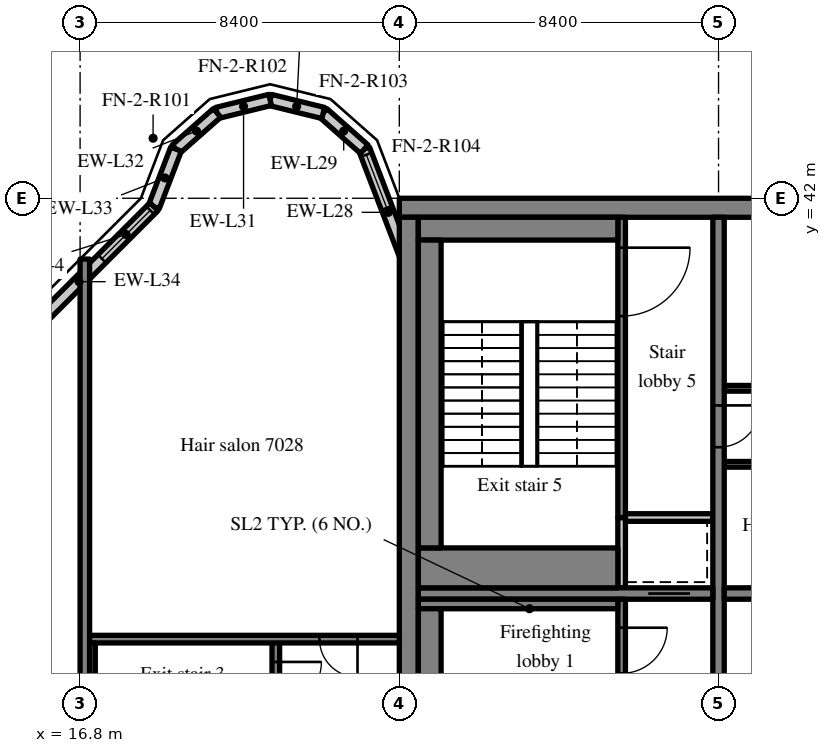
"""IFC4 building model, lengths in metres.
Left out: names, types, materials, properties, quantities, classifications, styles, units other than length and angle.
Written with IfcOpenShell. Run it as: python <this file> out.ifc"""

import sys

from ifc_helpers import new_model, si_unit, direction, frame, frame_2d, origin, place, context, subcontext, project, spatial, rectangle, extrude, source, transform, mapped, element, fill, save


model = new_model("IFC4")
c1 = context("Model", 3, precision=1e-05, world=origin(), true_north=direction((0.0, 1.0)))
c2 = subcontext(c1, "Body", "Model", "MODEL_VIEW")
j1 = project(units=[si_unit("LENGTHUNIT", "METRE"), si_unit("PLANEANGLEUNIT", "RADIAN")], contexts=[c1])
p1 = place(None, origin())
s1 = spatial("IfcSite", under=j1, at=p1, CompositionType="ELEMENT")
p2 = place(p1, origin())
s2 = spatial("IfcBuilding", under=s1, at=p2, CompositionType="ELEMENT")
p3 = place(p2, frame((0.0, 0.0, 293.7)))
s3 = spatial("IfcBuildingStorey", under=s2, at=p3, CompositionType="ELEMENT", Elevation=293.7)
m1 = source(origin(), c2, "Body", "SweptSolid", [
    extrude(rectangle(XDim=50.4, YDim=0.5, at=frame_2d((25.2, 0.0))), origin(), (0.0, 0.0, 1.0), 3.72),
])
p4 = place(p3, frame((25.2, 41.75, 0.0), z_axis=(0.0, 0.0, 1.0), x_axis=(1.0, 0.0, 0.0)))
e1 = element("IfcWall", 1, at=p4, inside=s3, PredefinedType="SHEAR", context=c2, shape_type="MappedRepresentation", body=[
    mapped(m1, transform((0.0, 0.0, 0.0), scale=1.0)),
])
m2 = source(origin(), c2, "Body", "SweptSolid", [
    extrude(rectangle(XDim=19.0, YDim=0.5, at=frame_2d((9.5, 0.0))), origin(), (0.0, 0.0, 1.0), 3.72),
])
p5 = place(p3, frame((25.45, 22.5, 0.0), z_axis=(0.0, 0.0, 1.0), x_axis=(0.0, 1.0, 0.0)))
e2 = element("IfcWall", 2, at=p5, inside=s3, PredefinedType="SHEAR", context=c2, shape_type="MappedRepresentation", body=[
    mapped(m2, transform((0.0, 0.0, 0.0), scale=1.0)),
])
m3 = source(origin(), c2, "Body", "SweptSolid", [
    extrude(rectangle(XDim=19.0, YDim=0.3, at=frame_2d((9.5, 0.0))), origin(), (0.0, 0.0, 1.0), 3.72),
])
p6 = place(p3, frame((33.6, 22.5, 0.0), z_axis=(0.0, 0.0, 1.0), x_axis=(0.0, 1.0, 0.0)))
e3 = element("IfcWall", 3, at=p6, inside=s3, PredefinedType="SHEAR", context=c2, shape_type="MappedRepresentation", body=[
    mapped(m3, transform((0.0, 0.0, 0.0), scale=1.0)),
])
m4 = source(origin(), c2, "Body", "SweptSolid", [
    extrude(rectangle(XDim=1.1, YDim=2.1, at=frame_2d((0.55, 1.05))), frame((0.0, 0.16, 0.0), z_axis=(0.0, -1.0, 0.0), x_axis=(1.0, 0.0, 0.0)), (0.0, 0.0, 1.0), 0.32),
])
p7 = place(p6, frame((12.95, 0.0, 0.0)))
e4 = element("IfcOpeningElement", 4, at=p7, cuts=e3, PredefinedType="OPENING", context=c2, shape_type="MappedRepresentation", body=[
    mapped(m4, transform((0.0, 0.0, 0.0), scale=1.0)),
])
m5 = source(origin(), c2, "Body", "SweptSolid", [
    extrude(rectangle(XDim=7.75, YDim=0.3, at=frame_2d((3.875, 0.0))), origin(), (0.0, 0.0, 1.0), 3.72),
])
p8 = place(p3, frame((25.7, 31.6, 0.0), z_axis=(0.0, 0.0, 1.0), x_axis=(1.0, 0.0, 0.0)))
e5 = element("IfcWall", 5, at=p8, inside=s3, PredefinedType="SHEAR", context=c2, shape_type="MappedRepresentation", body=[
    mapped(m5, transform((0.0, 0.0, 0.0), scale=1.0)),
])
p9 = place(p8, frame((6.05, 0.0, 0.0)))
e6 = element("IfcOpeningElement", 6, at=p9, cuts=e5, PredefinedType="OPENING", context=c2, shape_type="MappedRepresentation", body=[
    mapped(m4, transform((0.0, 0.0, 0.0), scale=1.0)),
])
m6 = source(origin(), c2, "Body", "SweptSolid", [
    extrude(rectangle(XDim=16.5, YDim=0.3, at=frame_2d((8.25, 0.0))), origin(), (0.0, 0.0, 1.0), 3.72),
])
p10 = place(p3, frame((33.75, 31.6, 0.0), z_axis=(0.0, 0.0, 1.0), x_axis=(1.0, 0.0, 0.0)))
e7 = element("IfcWall", 7, at=p10, inside=s3, PredefinedType="SHEAR", context=c2, shape_type="MappedRepresentation", body=[
    mapped(m6, transform((0.0, 0.0, 0.0), scale=1.0)),
])
m7 = source(origin(), c2, "Body", "SweptSolid", [
    extrude(rectangle(XDim=1.0, YDim=2.1, at=frame_2d((0.5, 1.05))), frame((0.0, 0.16, 0.0), z_axis=(0.0, -1.0, 0.0), x_axis=(1.0, 0.0, 0.0)), (0.0, 0.0, 1.0), 0.32),
])
p11 = place(p10, frame((14.875, 0.0, 0.0)))
e8 = element("IfcOpeningElement", 8, at=p11, cuts=e7, PredefinedType="OPENING", context=c2, shape_type="MappedRepresentation", body=[
    mapped(m7, transform((0.0, 0.0, 0.0), scale=1.0)),
])
m8 = source(origin(), c2, "Body", "SweptSolid", [
    extrude(rectangle(XDim=18.4, YDim=0.25, at=frame_2d((9.2, 0.0))), origin(), (0.0, 0.0, 1.0), 3.72),
])
p12 = place(p3, frame((16.925, 22.0, 0.0), z_axis=(0.0, 0.0, 1.0), x_axis=(0.0, 1.0, 0.0)))
e9 = element("IfcWall", 9, at=p12, inside=s3, PredefinedType="SHEAR", context=c2, shape_type="MappedRepresentation", body=[
    mapped(m8, transform((0.0, 0.0, 0.0), scale=1.0)),
])
m9 = source(origin(), c2, "Body", "SweptSolid", [
    extrude(rectangle(XDim=3.559, YDim=0.3, at=frame_2d((1.78, 0.0))), origin(), (0.0, 0.0, 1.0), 3.72),
])
p13 = place(p3, frame((25.55, 39.969, 0.0), z_axis=(0.0, 0.0, 1.0), x_axis=(-0.35779745313, 0.933799219604, 0.0)))
e10 = element("IfcWall", 10, at=p13, inside=s3, PredefinedType="SOLIDWALL", context=c2, shape_type="MappedRepresentation", body=[
    mapped(m9, transform((0.0, 0.0, 0.0), scale=1.0)),
])
m10 = source(origin(), c2, "Body", "SweptSolid", [
    extrude(rectangle(XDim=1.5, YDim=2.0, at=frame_2d((0.75, 1.0))), frame((0.0, 0.16, 0.0), z_axis=(0.0, -1.0, 0.0), x_axis=(1.0, 0.0, 0.0)), (0.0, 0.0, 1.0), 0.32),
])
p14 = place(p13, frame((1.903, 0.0, 0.9)))
e11 = element("IfcOpeningElement", 11, at=p14, cuts=e10, PredefinedType="OPENING", context=c2, shape_type="MappedRepresentation", body=[
    mapped(m10, transform((0.0, 0.0, 0.0), scale=1.0)),
])
m11 = source(origin(), c2, "Body", "SweptSolid", [
    extrude(rectangle(XDim=1.44, YDim=0.3, at=frame_2d((0.72, 0.0))), origin(), (0.0, 0.0, 1.0), 3.72),
])
p15 = place(p3, frame((24.277, 43.292, 0.0), z_axis=(0.0, 0.0, 1.0), x_axis=(-0.749649827867, 0.661834673902, 0.0)))
e12 = element("IfcWall", 12, at=p15, inside=s3, PredefinedType="SOLIDWALL", context=c2, shape_type="MappedRepresentation", body=[
    mapped(m11, transform((0.0, 0.0, 0.0), scale=1.0)),
])
m12 = source(origin(), c2, "Body", "SweptSolid", [
    extrude(rectangle(XDim=1.438, YDim=0.3, at=frame_2d((0.719, 0.0))), origin(), (0.0, 0.0, 1.0), 3.72),
])
p16 = place(p3, frame((23.197, 44.245, 0.0), z_axis=(0.0, 0.0, 1.0), x_axis=(-0.971152283879, 0.238460146601, 0.0)))
e13 = element("IfcWall", 13, at=p16, inside=s3, PredefinedType="SOLIDWALL", context=c2, shape_type="MappedRepresentation", body=[
    mapped(m12, transform((0.0, 0.0, 0.0), scale=1.0)),
])
m13 = source(origin(), c2, "Body", "SweptSolid", [
    extrude(rectangle(XDim=1.439, YDim=0.3, at=frame_2d((0.719, 0.0))), origin(), (0.0, 0.0, 1.0), 3.72),
])
p17 = place(p3, frame((21.8, 44.588, 0.0), z_axis=(0.0, 0.0, 1.0), x_axis=(-0.971161932466, -0.238420848351, 0.0)))
e14 = element("IfcWall", 14, at=p17, inside=s3, PredefinedType="SOLIDWALL", context=c2, shape_type="MappedRepresentation", body=[
    mapped(m13, transform((0.0, 0.0, 0.0), scale=1.0)),
])
m14 = source(origin(), c2, "Body", "SweptSolid", [
    extrude(rectangle(XDim=1.44, YDim=0.3, at=frame_2d((0.72, 0.0))), origin(), (0.0, 0.0, 1.0), 3.72),
])
p18 = place(p3, frame((20.403, 44.245, 0.0), z_axis=(0.0, 0.0, 1.0), x_axis=(-0.74957555648, -0.661918790432, 0.0)))
e15 = element("IfcWall", 15, at=p18, inside=s3, PredefinedType="SOLIDWALL", context=c2, shape_type="MappedRepresentation", body=[
    mapped(m14, transform((0.0, 0.0, 0.0), scale=1.0)),
])
m15 = source(origin(), c2, "Body", "SweptSolid", [
    extrude(rectangle(XDim=1.622, YDim=0.3, at=frame_2d((0.811, 0.0))), origin(), (0.0, 0.0, 1.0), 3.72),
])
p19 = place(p3, frame((19.323, 43.292, 0.0), z_axis=(0.0, 0.0, 1.0), x_axis=(-0.357778527068, -0.933806471154, 0.0)))
e16 = element("IfcWall", 16, at=p19, inside=s3, PredefinedType="SOLIDWALL", context=c2, shape_type="MappedRepresentation", body=[
    mapped(m15, transform((0.0, 0.0, 0.0), scale=1.0)),
])
m16 = source(origin(), c2, "Body", "SweptSolid", [
    extrude(rectangle(XDim=5.576, YDim=0.3, at=frame_2d((2.788, 0.0))), origin(), (0.0, 0.0, 1.0), 3.72),
])
p20 = place(p3, frame((18.743, 41.777, 0.0), z_axis=(0.0, 0.0, 1.0), x_axis=(-0.707106781187, -0.707106781187, 0.0)))
e17 = element("IfcWall", 17, at=p20, inside=s3, PredefinedType="SOLIDWALL", context=c2, shape_type="MappedRepresentation", body=[
    mapped(m16, transform((0.0, 0.0, 0.0), scale=1.0)),
])
m17 = source(origin(), c2, "Body", "SweptSolid", [
    extrude(rectangle(XDim=1.8, YDim=1.5, at=frame_2d((0.9, 0.75))), frame((0.0, 0.16, 0.0), z_axis=(0.0, -1.0, 0.0), x_axis=(1.0, 0.0, 0.0)), (0.0, 0.0, 1.0), 0.32),
])
p21 = place(p20, frame((0.135, 0.0, 0.9)))
e18 = element("IfcOpeningElement", 18, at=p21, cuts=e17, PredefinedType="OPENING", context=c2, shape_type="MappedRepresentation", body=[
    mapped(m17, transform((0.0, 0.0, 0.0), scale=1.0)),
])
m18 = source(origin(), c2, "Body", "SweptSolid", [
    extrude(rectangle(XDim=14.25, YDim=0.15, at=frame_2d((7.125, 0.0))), origin(), (0.0, 0.0, 1.0), 3.72),
])
p22 = place(p3, frame((33.75, 35.0, 0.0), z_axis=(0.0, 0.0, 1.0), x_axis=(1.0, 0.0, 0.0)))
e19 = element("IfcWall", 19, at=p22, inside=s3, PredefinedType="PARTITIONING", context=c2, shape_type="MappedRepresentation", body=[
    mapped(m18, transform((0.0, 0.0, 0.0), scale=1.0)),
])
m19 = source(origin(), c2, "Body", "SweptSolid", [
    extrude(rectangle(XDim=0.9, YDim=2.1, at=frame_2d((0.45, 1.05))), frame((0.0, 0.085, 0.0), z_axis=(0.0, -1.0, 0.0), x_axis=(1.0, 0.0, 0.0)), (0.0, 0.0, 1.0), 0.17),
])
p23 = place(p22, frame((2.031, 0.0, 0.0)))
e20 = element("IfcOpeningElement", 20, at=p23, cuts=e19, PredefinedType="OPENING", context=c2, shape_type="MappedRepresentation", body=[
    mapped(m19, transform((0.0, 0.0, 0.0), scale=1.0)),
])
p24 = place(p22, frame((9.118, 0.0, 0.0)))
e21 = element("IfcOpeningElement", 21, at=p24, cuts=e19, PredefinedType="OPENING", context=c2, shape_type="MappedRepresentation", body=[
    mapped(m19, transform((0.0, 0.0, 0.0), scale=1.0)),
])
m20 = source(origin(), c2, "Body", "SweptSolid", [
    extrude(rectangle(XDim=16.5, YDim=0.15, at=frame_2d((8.25, 0.0))), origin(), (0.0, 0.0, 1.0), 3.72),
])
p25 = place(p3, frame((33.75, 37.0, 0.0), z_axis=(0.0, 0.0, 1.0), x_axis=(1.0, 0.0, 0.0)))
e22 = element("IfcWall", 22, at=p25, inside=s3, PredefinedType="PARTITIONING", context=c2, shape_type="MappedRepresentation", body=[
    mapped(m20, transform((0.0, 0.0, 0.0), scale=1.0)),
])
p26 = place(p25, frame((3.262, 0.0, 0.0)))
e23 = element("IfcOpeningElement", 23, at=p26, cuts=e22, PredefinedType="OPENING", context=c2, shape_type="MappedRepresentation", body=[
    mapped(m19, transform((0.0, 0.0, 0.0), scale=1.0)),
])
p27 = place(p25, frame((8.212, 0.0, 0.0)))
e24 = element("IfcOpeningElement", 24, at=p27, cuts=e22, PredefinedType="OPENING", context=c2, shape_type="MappedRepresentation", body=[
    mapped(m19, transform((0.0, 0.0, 0.0), scale=1.0)),
])
p28 = place(p25, frame((11.512, 0.0, 0.0)))
e25 = element("IfcOpeningElement", 25, at=p28, cuts=e22, PredefinedType="OPENING", context=c2, shape_type="MappedRepresentation", body=[
    mapped(m19, transform((0.0, 0.0, 0.0), scale=1.0)),
])
p29 = place(p25, frame((14.813, 0.0, 0.0)))
e26 = element("IfcOpeningElement", 26, at=p29, cuts=e22, PredefinedType="OPENING", context=c2, shape_type="MappedRepresentation", body=[
    mapped(m19, transform((0.0, 0.0, 0.0), scale=1.0)),
])
m21 = source(origin(), c2, "Body", "SweptSolid", [
    extrude(rectangle(XDim=8.95, YDim=0.2, at=frame_2d((4.475, 0.0))), origin(), (0.0, 0.0, 1.0), 3.72),
])
p30 = place(p3, frame((31.05, 22.5, 0.0), z_axis=(0.0, 0.0, 1.0), x_axis=(0.0, 1.0, 0.0)))
e27 = element("IfcWall", 27, at=p30, inside=s3, PredefinedType="SOLIDWALL", context=c2, shape_type="MappedRepresentation", body=[
    mapped(m21, transform((0.0, 0.0, 0.0), scale=1.0)),
])
m22 = source(origin(), c2, "Body", "SweptSolid", [
    extrude(rectangle(XDim=1.2, YDim=2.1, at=frame_2d((0.6, 1.05))), frame((0.0, 0.11, 0.0), z_axis=(0.0, -1.0, 0.0), x_axis=(1.0, 0.0, 0.0)), (0.0, 0.0, 1.0), 0.22),
])
p31 = place(p30, frame((7.0, 0.0, 0.0)))
e28 = element("IfcOpeningElement", 28, at=p31, cuts=e27, PredefinedType="OPENING", context=c2, shape_type="MappedRepresentation", body=[
    mapped(m22, transform((0.0, 0.0, 0.0), scale=1.0)),
])
m23 = source(origin(), c2, "Body", "SweptSolid", [
    extrude(rectangle(XDim=1.85, YDim=0.2, at=frame_2d((0.925, 0.0))), origin(), (0.0, 0.0, 1.0), 3.72),
])
p32 = place(p3, frame((31.05, 31.75, 0.0), z_axis=(0.0, 0.0, 1.0), x_axis=(0.0, 1.0, 0.0)))
e29 = element("IfcWall", 29, at=p32, inside=s3, PredefinedType="SOLIDWALL", context=c2, shape_type="MappedRepresentation", body=[
    mapped(m23, transform((0.0, 0.0, 0.0), scale=1.0)),
])
m24 = source(origin(), c2, "Body", "SweptSolid", [
    extrude(rectangle(XDim=2.3, YDim=0.2, at=frame_2d((1.15, 0.0))), origin(), (0.0, 0.0, 1.0), 3.72),
])
p33 = place(p3, frame((31.15, 33.6, 0.0), z_axis=(0.0, 0.0, 1.0), x_axis=(1.0, 0.0, 0.0)))
e30 = element("IfcWall", 30, at=p33, inside=s3, PredefinedType="SOLIDWALL", context=c2, shape_type="MappedRepresentation", body=[
    mapped(m24, transform((0.0, 0.0, 0.0), scale=1.0)),
])
m25 = source(origin(), c2, "Body", "SweptSolid", [
    extrude(rectangle(XDim=7.9, YDim=0.2, at=frame_2d((3.95, 0.0))), origin(), (0.0, 0.0, 1.0), 3.72),
])
p34 = place(p3, frame((31.05, 33.6, 0.0), z_axis=(0.0, 0.0, 1.0), x_axis=(0.0, 1.0, 0.0)))
e31 = element("IfcWall", 31, at=p34, inside=s3, PredefinedType="SOLIDWALL", context=c2, shape_type="MappedRepresentation", body=[
    mapped(m25, transform((0.0, 0.0, 0.0), scale=1.0)),
])
m26 = source(origin(), c2, "Body", "SweptSolid", [
    extrude(rectangle(XDim=1.8, YDim=2.1, at=frame_2d((0.9, 1.05))), frame((0.0, 0.11, 0.0), z_axis=(0.0, -1.0, 0.0), x_axis=(1.0, 0.0, 0.0)), (0.0, 0.0, 1.0), 0.22),
])
p35 = place(p34, frame((5.3, 0.0, 0.0)))
e32 = element("IfcOpeningElement", 32, at=p35, cuts=e31, PredefinedType="OPENING", context=c2, shape_type="MappedRepresentation", body=[
    mapped(m26, transform((0.0, 0.0, 0.0), scale=1.0)),
])
m27 = source(origin(), c2, "Body", "SweptSolid", [
    extrude(rectangle(XDim=8.3, YDim=0.2, at=frame_2d((4.15, 0.0))), origin(), (0.0, 0.0, 1.0), 3.72),
])
p36 = place(p3, frame((21.95, 22.1, 0.0), z_axis=(0.0, 0.0, 1.0), x_axis=(0.0, 1.0, 0.0)))
e33 = element("IfcWall", 33, at=p36, inside=s3, PredefinedType="SOLIDWALL", context=c2, shape_type="MappedRepresentation", body=[
    mapped(m27, transform((0.0, 0.0, 0.0), scale=1.0)),
])
p37 = place(p36, frame((6.5, 0.0, 0.0)))
e34 = element("IfcOpeningElement", 34, at=p37, cuts=e33, PredefinedType="OPENING", context=c2, shape_type="MappedRepresentation", body=[
    mapped(m22, transform((0.0, 0.0, 0.0), scale=1.0)),
])
m28 = source(origin(), c2, "Body", "SweptSolid", [
    extrude(rectangle(XDim=8.15, YDim=0.2, at=frame_2d((4.075, 0.0))), origin(), (0.0, 0.0, 1.0), 3.72),
])
p38 = place(p3, frame((17.05, 30.4, 0.0), z_axis=(0.0, 0.0, 1.0), x_axis=(1.0, 0.0, 0.0)))
e35 = element("IfcWall", 35, at=p38, inside=s3, PredefinedType="SOLIDWALL", context=c2, shape_type="MappedRepresentation", body=[
    mapped(m28, transform((0.0, 0.0, 0.0), scale=1.0)),
])
m29 = source(origin(), c2, "Body", "SweptSolid", [
    extrude(rectangle(XDim=1.0, YDim=2.1, at=frame_2d((0.5, 1.05))), frame((0.0, 0.11, 0.0), z_axis=(0.0, -1.0, 0.0), x_axis=(1.0, 0.0, 0.0)), (0.0, 0.0, 1.0), 0.22),
])
p39 = place(p38, frame((6.05, 0.0, 0.0)))
e36 = element("IfcOpeningElement", 36, at=p39, cuts=e35, PredefinedType="OPENING", context=c2, shape_type="MappedRepresentation", body=[
    mapped(m29, transform((0.0, 0.0, 0.0), scale=1.0)),
])
m30 = source(origin(), c2, "Body", "SweptSolid", [
    extrude(rectangle(XDim=5.25, YDim=0.25, at=frame_2d((2.625, 0.0))), origin(), (0.0, 0.0, 1.0), 3.72),
])
p40 = place(p3, frame((25.7, 31.325, 0.0), z_axis=(0.0, 0.0, 1.0), x_axis=(1.0, 0.0, 0.0)))
e37 = element("IfcWall", 37, at=p40, inside=s3, PredefinedType="SOLIDWALL", context=c2, shape_type="MappedRepresentation", body=[
    mapped(m30, transform((0.0, 0.0, 0.0), scale=1.0)),
])
m31 = source(origin(), c2, "Body", "SweptSolid", [
    extrude(rectangle(XDim=8.1, YDim=0.6, at=frame_2d((4.05, 0.0))), origin(), (0.0, 0.0, 1.0), 3.72),
])
p41 = place(p3, frame((26.0, 23.1, 0.0), z_axis=(0.0, 0.0, 1.0), x_axis=(0.0, 1.0, 0.0)))
e38 = element("IfcWall", 38, at=p41, inside=s3, PredefinedType="SOLIDWALL", context=c2, shape_type="MappedRepresentation", body=[
    mapped(m31, transform((0.0, 0.0, 0.0), scale=1.0)),
])
m32 = source(origin(), c2, "Body", "SweptSolid", [
    extrude(rectangle(XDim=8.1, YDim=0.15, at=frame_2d((4.05, 0.0))), origin(), (0.0, 0.0, 1.0), 3.72),
])
p42 = place(p3, frame((17.125, 22.2, 0.0), z_axis=(0.0, 0.0, 1.0), x_axis=(0.0, 1.0, 0.0)))
e39 = element("IfcWall", 39, at=p42, inside=s3, PredefinedType="SOLIDWALL", context=c2, shape_type="MappedRepresentation", body=[
    mapped(m32, transform((0.0, 0.0, 0.0), scale=1.0)),
])
m33 = source(origin(), c2, "Body", "SweptSolid", [
    extrude(rectangle(XDim=5.25, YDim=0.6, at=frame_2d((2.625, 0.0))), origin(), (0.0, 0.0, 1.0), 3.72),
])
p43 = place(p3, frame((25.7, 41.2, 0.0), z_axis=(0.0, 0.0, 1.0), x_axis=(1.0, 0.0, 0.0)))
e40 = element("IfcWall", 40, at=p43, inside=s3, PredefinedType="SOLIDWALL", context=c2, shape_type="MappedRepresentation", body=[
    mapped(m33, transform((0.0, 0.0, 0.0), scale=1.0)),
])
m34 = source(origin(), c2, "Body", "SweptSolid", [
    extrude(rectangle(XDim=5.25, YDim=1.05, at=frame_2d((2.625, 0.0))), origin(), (0.0, 0.0, 1.0), 3.72),
])
p44 = place(p3, frame((25.7, 32.275, 0.0), z_axis=(0.0, 0.0, 1.0), x_axis=(1.0, 0.0, 0.0)))
e41 = element("IfcWall", 41, at=p44, inside=s3, PredefinedType="SOLIDWALL", context=c2, shape_type="MappedRepresentation", body=[
    mapped(m34, transform((0.0, 0.0, 0.0), scale=1.0)),
])
p45 = place(p3, frame((26.0, 32.8, 0.0), z_axis=(0.0, 0.0, 1.0), x_axis=(0.0, 1.0, 0.0)))
e42 = element("IfcWall", 42, at=p45, inside=s3, PredefinedType="SOLIDWALL", context=c2, shape_type="MappedRepresentation", body=[
    mapped(m31, transform((0.0, 0.0, 0.0), scale=1.0)),
])
m35 = source(origin(), c2, "Body", "SweptSolid", [
    extrude(rectangle(XDim=1.5, YDim=2.0, at=frame_2d((0.75, 1.0))), frame((0.0, 0.03, 0.0), z_axis=(0.0, -1.0, 0.0), x_axis=(1.0, 0.0, 0.0)), (0.0, 0.0, 1.0), 0.06),
])
p46 = place(p14, origin())
e43 = element("IfcWindow", 43, at=p46, inside=s3, PartitioningType="SINGLE_PANEL", PredefinedType="WINDOW", context=c2, shape_type="MappedRepresentation", body=[
    mapped(m35, transform((0.0, 0.0, 0.0), scale=1.0)),
])
fill(e11, e43)
m36 = source(origin(), c2, "Body", "SweptSolid", [
    extrude(rectangle(XDim=1.8, YDim=1.5, at=frame_2d((0.9, 0.75))), frame((0.0, 0.03, 0.0), z_axis=(0.0, -1.0, 0.0), x_axis=(1.0, 0.0, 0.0)), (0.0, 0.0, 1.0), 0.06),
])
p47 = place(p21, origin())
e44 = element("IfcWindow", 44, at=p47, inside=s3, PartitioningType="SINGLE_PANEL", PredefinedType="WINDOW", context=c2, shape_type="MappedRepresentation", body=[
    mapped(m36, transform((0.0, 0.0, 0.0), scale=1.0)),
])
fill(e18, e44)
m37 = source(origin(), c2, "Body", "SweptSolid", [
    extrude(rectangle(XDim=1.2, YDim=2.1, at=frame_2d((0.6, 1.05))), frame((0.0, 0.025, 0.0), z_axis=(0.0, -1.0, 0.0), x_axis=(1.0, 0.0, 0.0)), (0.0, 0.0, 1.0), 0.05),
])
p48 = place(p31, origin())
e45 = element("IfcDoor", 45, at=p48, inside=s3, OperationType="SINGLE_SWING_RIGHT", PredefinedType="DOOR", context=c2, shape_type="MappedRepresentation", body=[
    mapped(m37, transform((0.0, 0.0, 0.0), scale=1.0)),
])
fill(e28, e45)
m38 = source(origin(), c2, "Body", "SweptSolid", [
    extrude(rectangle(XDim=1.1, YDim=2.1, at=frame_2d((0.55, 1.05))), frame((0.0, 0.025, 0.0), z_axis=(0.0, -1.0, 0.0), x_axis=(1.0, 0.0, 0.0)), (0.0, 0.0, 1.0), 0.05),
])
p49 = place(p9, origin())
e46 = element("IfcDoor", 46, at=p49, inside=s3, OperationType="SLIDING_TO_LEFT", PredefinedType="DOOR", context=c2, shape_type="MappedRepresentation", body=[
    mapped(m38, transform((0.0, 0.0, 0.0), scale=1.0)),
])
fill(e6, e46)
m39 = source(origin(), c2, "Body", "SweptSolid", [
    extrude(rectangle(XDim=1.8, YDim=2.1, at=frame_2d((0.9, 1.05))), frame((0.0, 0.025, 0.0), z_axis=(0.0, -1.0, 0.0), x_axis=(1.0, 0.0, 0.0)), (0.0, 0.0, 1.0), 0.05),
])
p50 = place(p35, origin())
e47 = element("IfcDoor", 47, at=p50, inside=s3, OperationType="SINGLE_SWING_RIGHT", PredefinedType="DOOR", context=c2, shape_type="MappedRepresentation", body=[
    mapped(m39, transform((0.0, 0.0, 0.0), scale=1.0)),
])
fill(e32, e47)
p51 = place(p37, origin())
e48 = element("IfcDoor", 48, at=p51, inside=s3, OperationType="SINGLE_SWING_RIGHT", PredefinedType="DOOR", context=c2, shape_type="MappedRepresentation", body=[
    mapped(m37, transform((0.0, 0.0, 0.0), scale=1.0)),
])
fill(e34, e48)
m40 = source(origin(), c2, "Body", "SweptSolid", [
    extrude(rectangle(XDim=1.0, YDim=2.1, at=frame_2d((0.5, 1.05))), frame((0.0, 0.025, 0.0), z_axis=(0.0, -1.0, 0.0), x_axis=(1.0, 0.0, 0.0)), (0.0, 0.0, 1.0), 0.05),
])
p52 = place(p39, origin())
e49 = element("IfcDoor", 49, at=p52, inside=s3, OperationType="SINGLE_SWING_RIGHT", PredefinedType="DOOR", context=c2, shape_type="MappedRepresentation", body=[
    mapped(m40, transform((0.0, 0.0, 0.0), scale=1.0)),
])
fill(e36, e49)
p53 = place(p7, origin())
e50 = element("IfcDoor", 50, at=p53, inside=s3, OperationType="SINGLE_SWING_RIGHT", PredefinedType="DOOR", context=c2, shape_type="MappedRepresentation", body=[
    mapped(m38, transform((0.0, 0.0, 0.0), scale=1.0)),
])
fill(e4, e50)
save(model, sys.argv[1])
